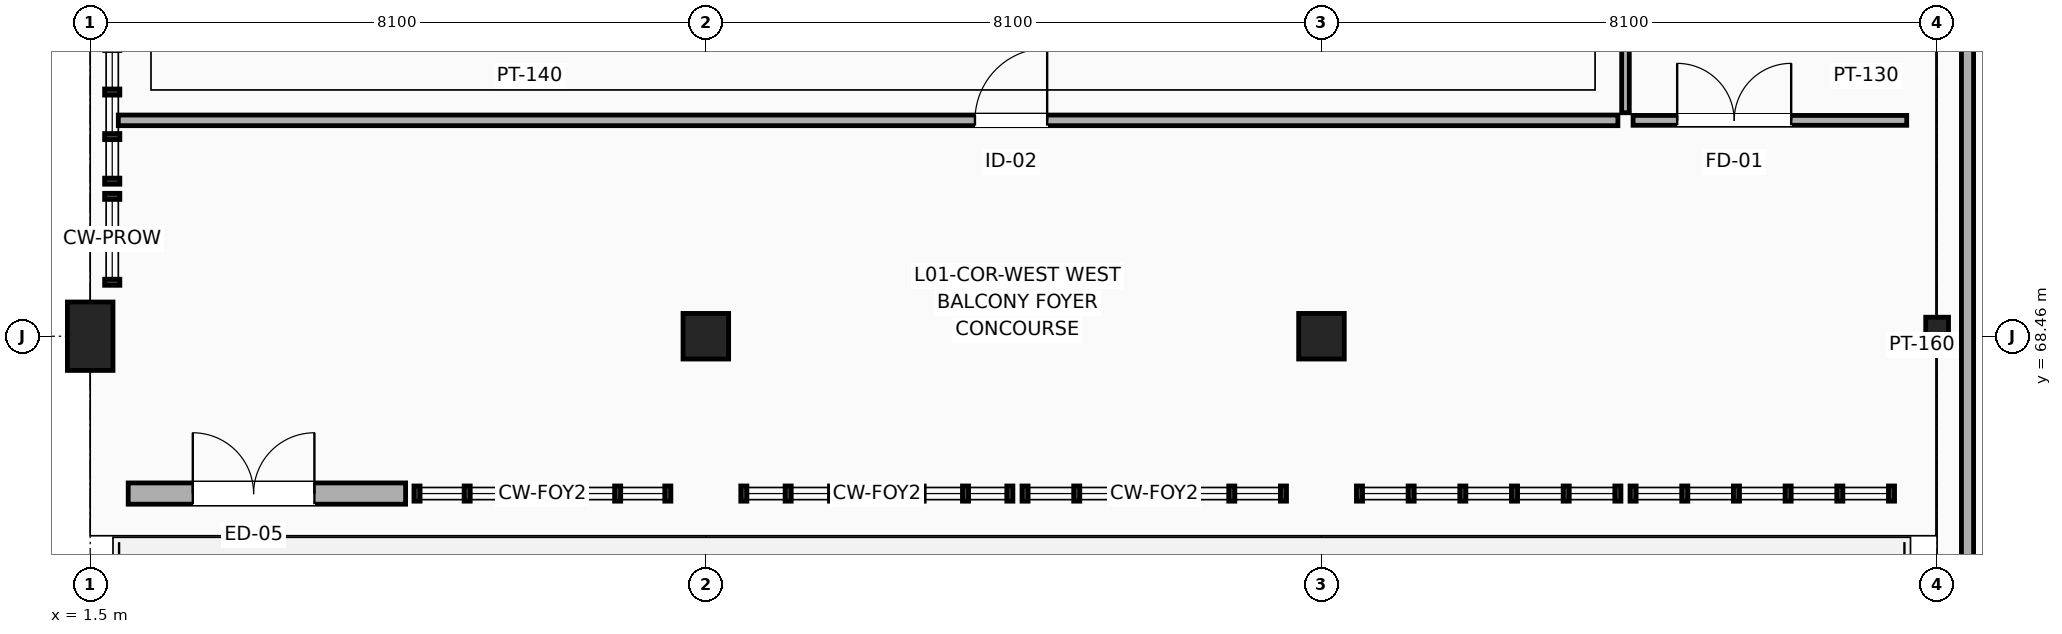
"""IFC4 building model, lengths in metres.
Left out: names, types, materials, properties, quantities, classifications, styles, units other than length and angle.
Written with IfcOpenShell. Run it as: python <this file> out.ifc"""

import sys

from ifc_helpers import new_model, si_unit, direction, frame, frame_2d, origin, origin_2d, place, context, subcontext, project, spatial, rectangle, i_section, extrude, element, fill, save


model = new_model("IFC4")
c1 = context("Model", 3, precision=1e-05, world=origin(), true_north=direction((0.0, 1.0)))
c2 = subcontext(c1, "Body", "Model", "MODEL_VIEW")
j1 = project(units=[si_unit("LENGTHUNIT", "METRE"), si_unit("PLANEANGLEUNIT", "RADIAN")], contexts=[c1])
p1 = place(None, origin())
s1 = spatial("IfcSite", under=j1, at=p1, CompositionType="ELEMENT")
p2 = place(p1, origin())
s2 = spatial("IfcBuilding", under=s1, at=p2, CompositionType="ELEMENT")
p3 = place(p2, frame((0.0, 0.0, 5.4)))
s3 = spatial("IfcBuildingStorey", under=s2, at=p3, CompositionType="ELEMENT", Elevation=5.4)
p4 = place(p3, frame((1.5, 68.46, 0.0), z_axis=(0.0, 0.0, 1.0), x_axis=(1.0, 0.0, 0.0)))
e1 = element("IfcColumn", 1, at=p4, inside=s3, PredefinedType="COLUMN", context=c2, shape_type="SweptSolid", body=[
    extrude(rectangle(XDim=0.6, YDim=0.9, at=origin_2d()), origin(), (0.0, 0.0, 1.0), 4.8),
])
for number, where, z_axis, x_axis in (
    (2, (9.6, 68.46, 0.0), (0.0, 0.0, 1.0), (1.0, 0.0, 0.0)),
    (3, (17.7, 68.46, 0.0), (0.0, 0.0, 1.0), (1.0, 0.0, 0.0)),
):
    element("IfcColumn", number, at=place(p3, frame(where, z_axis=z_axis, x_axis=x_axis)), inside=s3, PredefinedType="COLUMN", context=c2, shape_type="SweptSolid", body=[
        extrude(rectangle(XDim=0.6, YDim=0.6, at=origin_2d()), origin(), (0.0, 0.0, 1.0), 4.8),
    ])
p5 = place(p3, frame((25.8, 68.46, 0.0), z_axis=(0.0, 0.0, 1.0), x_axis=(1.0, 0.0, 0.0)))
e4 = element("IfcColumn", 4, at=p5, inside=s3, PredefinedType="COLUMN", context=c2, shape_type="SweptSolid", body=[
    extrude(i_section(OverallWidth=0.3, OverallDepth=0.5, WebThickness=0.014, FlangeThickness=0.028, FilletRadius=0.027, at=origin_2d()), origin(), (0.0, 0.0, 1.0), 4.8),
])
p6 = place(p3, frame((2.0, 66.39, 0.0), z_axis=(0.0, 0.0, 1.0), x_axis=(1.0, 0.0, 0.0)))
e5 = element("IfcWall", 5, at=p6, inside=s3, PredefinedType="SOLIDWALL", context=c2, shape_type="SweptSolid", body=[
    extrude(rectangle(XDim=3.65, YDim=0.28, at=frame_2d((1.825, 0.0))), origin(), (0.0, 0.0, 1.0), 4.505),
])
p7 = place(p6, frame((0.85, 0.0, 0.0)))
e6 = element("IfcOpeningElement", 6, at=p7, cuts=e5, PredefinedType="OPENING", context=c2, shape_type="SweptSolid", body=[
    extrude(rectangle(XDim=1.6, YDim=2.3, at=frame_2d((0.8, 1.15))), frame((0.0, 0.15, 0.0), z_axis=(0.0, -1.0, 0.0), x_axis=(1.0, 0.0, 0.0)), (0.0, 0.0, 1.0), 0.3),
])
p8 = place(p3, frame((1.87, 71.3, 0.0), z_axis=(0.0, 0.0, 1.0), x_axis=(1.0, 0.0, 0.0)))
e7 = element("IfcWall", 7, at=p8, inside=s3, PredefinedType="PARTITIONING", context=c2, shape_type="SweptSolid", body=[
    extrude(rectangle(XDim=19.73, YDim=0.14, at=frame_2d((9.865, 0.0))), origin(), (0.0, 0.0, 1.0), 3.837),
])
p9 = place(p8, frame((11.271, 0.0, 0.0)))
e8 = element("IfcOpeningElement", 8, at=p9, cuts=e7, PredefinedType="OPENING", context=c2, shape_type="SweptSolid", body=[
    extrude(rectangle(XDim=0.95, YDim=2.15, at=frame_2d((0.475, 1.075))), frame((0.0, 0.08, 0.0), z_axis=(0.0, -1.0, 0.0), x_axis=(1.0, 0.0, 0.0)), (0.0, 0.0, 1.0), 0.16),
])
p10 = place(p3, frame((21.8, 71.3, 0.0), z_axis=(0.0, 0.0, 1.0), x_axis=(1.0, 0.0, 0.0)))
e9 = element("IfcWall", 9, at=p10, inside=s3, PredefinedType="PARTITIONING", context=c2, shape_type="SweptSolid", body=[
    extrude(rectangle(XDim=3.6, YDim=0.13, at=frame_2d((1.8, 0.0))), origin(), (0.0, 0.0, 1.0), 4.087),
])
p11 = place(p10, frame((0.58, 0.0, 0.0)))
e10 = element("IfcOpeningElement", 10, at=p11, cuts=e9, PredefinedType="OPENING", context=c2, shape_type="SweptSolid", body=[
    extrude(rectangle(XDim=1.5, YDim=2.2, at=frame_2d((0.75, 1.1))), frame((0.0, 0.075, 0.0), z_axis=(0.0, -1.0, 0.0), x_axis=(1.0, 0.0, 0.0)), (0.0, 0.0, 1.0), 0.15),
])
p12 = place(p3, frame((21.7, 71.4, 0.0), z_axis=(0.0, 0.0, 1.0), x_axis=(0.0, 1.0, 0.0)))
e11 = element("IfcWall", 11, at=p12, inside=s3, PredefinedType="PARTITIONING", context=c2, shape_type="SweptSolid", body=[
    extrude(rectangle(XDim=11.4, YDim=0.1, at=frame_2d((5.7, 0.0))), origin(), (0.0, 0.0, 1.0), 3.987),
])
p13 = place(p12, frame((7.453, 0.0, 0.0)))
e12 = element("IfcOpeningElement", 12, at=p13, cuts=e11, PredefinedType="OPENING", context=c2, shape_type="SweptSolid", body=[
    extrude(rectangle(XDim=1.6, YDim=2.3, at=frame_2d((0.8, 1.15))), frame((0.0, 0.06, 0.0), z_axis=(0.0, -1.0, 0.0), x_axis=(1.0, 0.0, 0.0)), (0.0, 0.0, 1.0), 0.12),
])
p14 = place(p3, frame((26.2, 61.4, 0.0), z_axis=(0.0, 0.0, 1.0), x_axis=(0.0, 1.0, 0.0)))
e13 = element("IfcWall", 13, at=p14, inside=s3, PredefinedType="PARTITIONING", context=c2, shape_type="SweptSolid", body=[
    extrude(rectangle(XDim=13.9, YDim=0.16, at=frame_2d((6.95, 0.0))), origin(), (0.0, 0.0, 1.0), 4.505),
])
p15 = place(p7, origin())
e14 = element("IfcDoor", 14, at=p15, inside=s3, OperationType="DOUBLE_DOOR_SINGLE_SWING", PredefinedType="DOOR", context=c2, shape_type="SweptSolid", body=[
    extrude(rectangle(XDim=1.6, YDim=2.3, at=frame_2d((0.8, 1.15))), frame((0.0, 0.025, 0.0), z_axis=(0.0, -1.0, 0.0), x_axis=(1.0, 0.0, 0.0)), (0.0, 0.0, 1.0), 0.05),
])
fill(e6, e14)
p16 = place(p9, origin())
e15 = element("IfcDoor", 15, at=p16, inside=s3, OperationType="SINGLE_SWING_RIGHT", PredefinedType="DOOR", context=c2, shape_type="SweptSolid", body=[
    extrude(rectangle(XDim=0.95, YDim=2.15, at=frame_2d((0.475, 1.075))), frame((0.0, 0.025, 0.0), z_axis=(0.0, -1.0, 0.0), x_axis=(1.0, 0.0, 0.0)), (0.0, 0.0, 1.0), 0.05),
])
fill(e8, e15)
p17 = place(p11, origin())
e16 = element("IfcDoor", 16, at=p17, inside=s3, OperationType="DOUBLE_DOOR_SINGLE_SWING", PredefinedType="DOOR", context=c2, shape_type="SweptSolid", body=[
    extrude(rectangle(XDim=1.5, YDim=2.2, at=frame_2d((0.75, 1.1))), frame((0.0, 0.025, 0.0), z_axis=(0.0, -1.0, 0.0), x_axis=(1.0, 0.0, 0.0)), (0.0, 0.0, 1.0), 0.05),
])
fill(e10, e16)
save(model, sys.argv[1])
